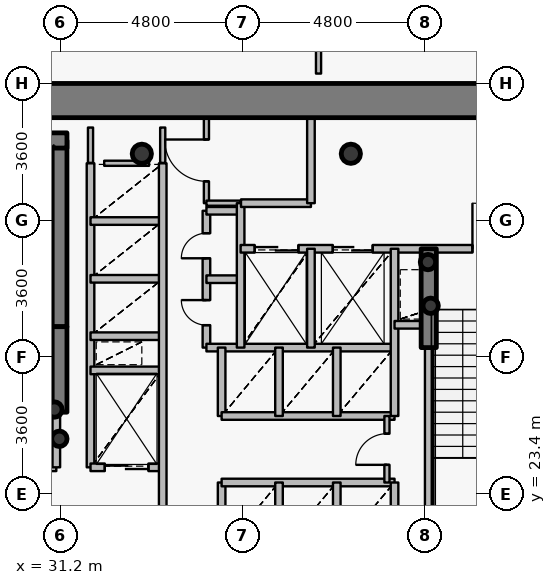
"""IFC4 building model, lengths in metres.
Left out: names, types, materials, properties, quantities, classifications, styles, units other than length and angle.
Written with IfcOpenShell. Run it as: python <this file> out.ifc"""

import sys

from ifc_helpers import new_model, si_unit, direction, frame, frame_2d, origin, origin_2d, place, context, subcontext, project, spatial, rectangle, hollow_circle, extrude, source, transform, mapped, element, fill, save


model = new_model("IFC4")
c1 = context("Model", 3, precision=1e-05, world=origin(), true_north=direction((0.0, 1.0)))
c2 = subcontext(c1, "Body", "Model", "MODEL_VIEW")
j1 = project(units=[si_unit("LENGTHUNIT", "METRE"), si_unit("PLANEANGLEUNIT", "RADIAN")], contexts=[c1])
p1 = place(None, origin())
s1 = spatial("IfcSite", under=j1, at=p1, CompositionType="ELEMENT")
p2 = place(p1, origin())
s2 = spatial("IfcBuilding", under=s1, at=p2, CompositionType="ELEMENT")
p3 = place(p2, frame((0.0, 0.0, 22.8)))
s3 = spatial("IfcBuildingStorey", under=s2, at=p3, CompositionType="ELEMENT", Elevation=22.8)
for number, where, z_axis, x_axis in (
    (1, (38.85, 32.35, 0.0), (0.0, 0.0, 1.0), (1.0, 0.0, 0.0)),
    (2, (33.35, 32.35, 0.0), (0.0, 0.0, 1.0), (1.0, 0.0, 0.0)),
):
    element("IfcColumn", number, at=place(p3, frame(where, z_axis=z_axis, x_axis=x_axis)), inside=s3, PredefinedType="COLUMN", context=c2, shape_type="SweptSolid", body=[
        extrude(hollow_circle(Radius=0.254, WallThickness=0.02, at=origin_2d()), origin(), (0.0, 0.0, 1.0), 4.2),
    ])
p4 = place(p3, frame((31.18, 27.8, 0.0), z_axis=(0.0, 0.0, 1.0), x_axis=(0.0, 1.0, 0.0)))
e3 = element("IfcWall", 3, at=p4, inside=s3, PredefinedType="SHEAR", context=c2, shape_type="SweptSolid", body=[
    extrude(rectangle(XDim=4.9, YDim=0.4, at=frame_2d((2.45, 0.0))), origin(), (0.0, 0.0, 1.0), 4.2),
])
p5 = place(p3, frame((27.28, 32.7, 0.0), z_axis=(0.0, 0.0, 1.0), x_axis=(1.0, 0.0, 0.0)))
e4 = element("IfcWall", 4, at=p5, inside=s3, PredefinedType="SHEAR", context=c2, shape_type="SweptSolid", body=[
    extrude(rectangle(XDim=4.1, YDim=0.4, at=frame_2d((2.05, 0.0))), origin(), (0.0, 0.0, 1.0), 4.2),
])
for number, where, z_axis, x_axis in (
    (5, (31.05, 25.62, 0.0), (0.0, 0.0, 1.0), (1.0, 0.0, 0.0)),
    (6, (31.18, 24.85, 0.0), (0.0, 0.0, 1.0), (1.0, 0.0, 0.0)),
    (7, (40.95, 28.35, 0.0), (0.0, 0.0, 1.0), (1.0, 0.0, 0.0)),
    (8, (40.88, 29.5, 0.0), (0.0, 0.0, 1.0), (1.0, 0.0, 0.0)),
):
    element("IfcColumn", number, at=place(p3, frame(where, z_axis=z_axis, x_axis=x_axis)), inside=s3, PredefinedType="COLUMN", context=c2, shape_type="SweptSolid", body=[
        extrude(hollow_circle(Radius=0.203, WallThickness=0.016, at=origin_2d()), origin(), (0.0, 0.0, 1.0), 4.2),
    ])
p6 = place(p3, frame((26.75, 33.75, 0.0), z_axis=(0.0, 0.0, 1.0), x_axis=(1.0, 0.0, 0.0)))
e9 = element("IfcWall", 9, at=p6, inside=s3, PredefinedType="SHEAR", context=c2, shape_type="SweptSolid", body=[
    extrude(rectangle(XDim=18.5, YDim=0.9, at=frame_2d((9.25, 0.0))), origin(), (0.0, 0.0, 1.0), 3.35),
])
p7 = place(p3, frame((31.18, 25.55, 0.0), z_axis=(0.0, 0.0, 1.0), x_axis=(0.0, 1.0, 0.0)))
e10 = element("IfcWall", 10, at=p7, inside=s3, PredefinedType="SHEAR", context=c2, shape_type="SweptSolid", body=[
    extrude(rectangle(XDim=2.25, YDim=0.4, at=frame_2d((1.125, 0.0))), origin(), (0.0, 0.0, 1.0), 3.5),
])
p8 = place(p3, frame((40.9, 27.25, 0.0), z_axis=(0.0, 0.0, 1.0), x_axis=(0.0, 1.0, 0.0)))
e11 = element("IfcWall", 11, at=p8, inside=s3, PredefinedType="SHEAR", context=c2, shape_type="SweptSolid", body=[
    extrude(rectangle(XDim=2.6, YDim=0.4, at=frame_2d((1.3, 0.0))), origin(), (0.0, 0.0, 1.0), 3.5),
])
p9 = place(p3, frame((27.56, 24.1, 0.0), z_axis=(0.0, 0.0, 1.0), x_axis=(1.0, 0.0, 0.0)))
e12 = element("IfcWall", 12, at=p9, inside=s3, PredefinedType="PARTITIONING", context=c2, shape_type="SweptSolid", body=[
    extrude(rectangle(XDim=3.54, YDim=0.2, at=frame_2d((1.77, 0.0))), origin(), (0.0, 0.0, 1.0), 3.9),
])
p10 = place(p9, frame((1.17, 0.0, 0.0)))
e13 = element("IfcOpeningElement", 13, at=p10, cuts=e12, PredefinedType="OPENING", context=c2, shape_type="SweptSolid", body=[
    extrude(rectangle(XDim=1.2, YDim=2.15, at=origin_2d()), frame((0.6, 0.11, 1.075), z_axis=(0.0, -1.0, 0.0), x_axis=(1.0, 0.0, 0.0)), (0.0, 0.0, 1.0), 0.22),
])
p11 = place(p3, frame((31.1, 24.1, 0.0), z_axis=(0.0, 0.0, 1.0), x_axis=(0.0, 1.0, 0.0)))
e14 = element("IfcWall", 14, at=p11, inside=s3, PredefinedType="PARTITIONING", context=c2, shape_type="SweptSolid", body=[
    extrude(rectangle(XDim=1.44, YDim=0.2, at=frame_2d((0.72, 0.0))), origin(), (0.0, 0.0, 1.0), 3.9),
])
p12 = place(p3, frame((32.0, 24.1, 0.0), z_axis=(0.0, 0.0, 1.0), x_axis=(0.0, 1.0, 0.0)))
e15 = element("IfcWall", 15, at=p12, inside=s3, PredefinedType="PARTITIONING", context=c2, shape_type="SweptSolid", body=[
    extrude(rectangle(XDim=8.0, YDim=0.2, at=frame_2d((4.0, 0.0))), origin(), (0.0, 0.0, 1.0), 3.9),
])
p13 = place(p3, frame((32.0, 24.1, 0.0), z_axis=(0.0, 0.0, 1.0), x_axis=(1.0, 0.0, 0.0)))
e16 = element("IfcWall", 16, at=p13, inside=s3, PredefinedType="PARTITIONING", context=c2, shape_type="SweptSolid", body=[
    extrude(rectangle(XDim=1.9, YDim=0.2, at=frame_2d((0.95, 0.0))), origin(), (0.0, 0.0, 1.0), 3.485),
])
p14 = place(p13, frame((0.375, 0.0, 0.0)))
e17 = element("IfcOpeningElement", 17, at=p14, cuts=e16, PredefinedType="OPENING", context=c2, shape_type="SweptSolid", body=[
    extrude(rectangle(XDim=1.15, YDim=2.15, at=origin_2d()), frame((0.575, 0.11, 1.075), z_axis=(0.0, -1.0, 0.0), x_axis=(1.0, 0.0, 0.0)), (0.0, 0.0, 1.0), 0.22),
])
for number, where, z_axis, x_axis in (
    (18, (32.0, 26.65, 0.0), (0.0, 0.0, 1.0), (1.0, 0.0, 0.0)),
    (19, (32.0, 27.55, 0.0), (0.0, 0.0, 1.0), (1.0, 0.0, 0.0)),
    (20, (32.0, 29.06, 0.0), (0.0, 0.0, 1.0), (1.0, 0.0, 0.0)),
    (21, (32.0, 30.58, 0.0), (0.0, 0.0, 1.0), (1.0, 0.0, 0.0)),
):
    element("IfcWall", number, at=place(p3, frame(where, z_axis=z_axis, x_axis=x_axis)), inside=s3, PredefinedType="PARTITIONING", context=c2, shape_type="SweptSolid", body=[
        extrude(rectangle(XDim=1.9, YDim=0.2, at=frame_2d((0.95, 0.0))), origin(), (0.0, 0.0, 1.0), 3.485),
    ])
p15 = place(p3, frame((33.9, 20.7, 0.0), z_axis=(0.0, 0.0, 1.0), x_axis=(0.0, 1.0, 0.0)))
e22 = element("IfcWall", 22, at=p15, inside=s3, PredefinedType="PARTITIONING", context=c2, shape_type="SweptSolid", body=[
    extrude(rectangle(XDim=11.4, YDim=0.2, at=frame_2d((5.7, 0.0))), origin(), (0.0, 0.0, 1.0), 3.485),
])
p16 = place(p3, frame((35.05, 27.25, 0.0), z_axis=(0.0, 0.0, 1.0), x_axis=(0.0, 1.0, 0.0)))
e23 = element("IfcWall", 23, at=p16, inside=s3, PredefinedType="PARTITIONING", context=c2, shape_type="SweptSolid", body=[
    extrude(rectangle(XDim=3.6, YDim=0.2, at=frame_2d((1.8, 0.0))), origin(), (0.0, 0.0, 1.0), 3.9),
])
p17 = place(p16, frame((0.59, 0.0, 0.0)))
e24 = element("IfcOpeningElement", 24, at=p17, cuts=e23, PredefinedType="OPENING", context=c2, shape_type="SweptSolid", body=[
    extrude(rectangle(XDim=0.66, YDim=2.05, at=origin_2d()), frame((0.33, 0.11, 1.025), z_axis=(0.0, -1.0, 0.0), x_axis=(1.0, 0.0, 0.0)), (0.0, 0.0, 1.0), 0.22),
])
p18 = place(p16, frame((2.35, 0.0, 0.0)))
e25 = element("IfcOpeningElement", 25, at=p18, cuts=e23, PredefinedType="OPENING", context=c2, shape_type="SweptSolid", body=[
    extrude(rectangle(XDim=0.66, YDim=2.05, at=origin_2d()), frame((0.33, 0.11, 1.025), z_axis=(0.0, -1.0, 0.0), x_axis=(1.0, 0.0, 0.0)), (0.0, 0.0, 1.0), 0.22),
])
p19 = place(p3, frame((35.05, 27.25, 0.0), z_axis=(0.0, 0.0, 1.0), x_axis=(1.0, 0.0, 0.0)))
e26 = element("IfcWall", 26, at=p19, inside=s3, PredefinedType="PARTITIONING", context=c2, shape_type="SweptSolid", body=[
    extrude(rectangle(XDim=4.95, YDim=0.2, at=frame_2d((2.475, 0.0))), origin(), (0.0, 0.0, 1.0), 3.485),
])
for number, where, z_axis, x_axis in (
    (27, (35.05, 29.05, 0.0), (0.0, 0.0, 1.0), (1.0, 0.0, 0.0)),
    (28, (35.05, 30.85, 0.0), (0.0, 0.0, 1.0), (1.0, 0.0, 0.0)),
):
    element("IfcWall", number, at=place(p3, frame(where, z_axis=z_axis, x_axis=x_axis)), inside=s3, PredefinedType="PARTITIONING", context=c2, shape_type="SweptSolid", body=[
        extrude(rectangle(XDim=0.9, YDim=0.2, at=frame_2d((0.45, 0.0))), origin(), (0.0, 0.0, 1.0), 3.9),
    ])
p20 = place(p3, frame((35.05, 31.05, 0.0), z_axis=(0.0, 0.0, 1.0), x_axis=(0.0, 1.0, 0.0)))
e29 = element("IfcWall", 29, at=p20, inside=s3, PredefinedType="PARTITIONING", context=c2, shape_type="SweptSolid", body=[
    extrude(rectangle(XDim=2.25, YDim=0.135, at=frame_2d((1.125, 0.0))), origin(), (0.0, 0.0, 1.0), 3.485),
])
p21 = place(p20, frame((0.575, 0.0, 0.0)))
e30 = element("IfcOpeningElement", 30, at=p21, cuts=e29, PredefinedType="OPENING", context=c2, shape_type="SweptSolid", body=[
    extrude(rectangle(XDim=1.1, YDim=2.15, at=origin_2d()), frame((0.55, 0.078, 1.075), z_axis=(0.0, -1.0, 0.0), x_axis=(1.0, 0.0, 0.0)), (0.0, 0.0, 1.0), 0.155),
])
p22 = place(p3, frame((35.05, 31.05, 0.0), z_axis=(0.0, 0.0, 1.0), x_axis=(1.0, 0.0, 0.0)))
e31 = element("IfcWall", 31, at=p22, inside=s3, PredefinedType="PARTITIONING", context=c2, shape_type="SweptSolid", body=[
    extrude(rectangle(XDim=0.9, YDim=0.135, at=frame_2d((0.45, 0.0))), origin(), (0.0, 0.0, 1.0), 3.9),
])
p23 = place(p3, frame((35.45, 21.9, 0.0), z_axis=(0.0, 0.0, 1.0), x_axis=(0.0, 1.0, 0.0)))
e32 = element("IfcWall", 32, at=p23, inside=s3, PredefinedType="PARTITIONING", context=c2, shape_type="SweptSolid", body=[
    extrude(rectangle(XDim=1.8, YDim=0.2, at=frame_2d((0.9, 0.0))), origin(), (0.0, 0.0, 1.0), 3.9),
])
p24 = place(p3, frame((35.45, 23.7, 0.0), z_axis=(0.0, 0.0, 1.0), x_axis=(1.0, 0.0, 0.0)))
e33 = element("IfcWall", 33, at=p24, inside=s3, PredefinedType="PARTITIONING", context=c2, shape_type="SweptSolid", body=[
    extrude(rectangle(XDim=4.55, YDim=0.2, at=frame_2d((2.275, 0.0))), origin(), (0.0, 0.0, 1.0), 3.485),
])
p25 = place(p3, frame((35.45, 25.45, 0.0), z_axis=(0.0, 0.0, 1.0), x_axis=(0.0, 1.0, 0.0)))
e34 = element("IfcWall", 34, at=p25, inside=s3, PredefinedType="PARTITIONING", context=c2, shape_type="SweptSolid", body=[
    extrude(rectangle(XDim=1.8, YDim=0.2, at=frame_2d((0.9, 0.0))), origin(), (0.0, 0.0, 1.0), 3.9),
])
p26 = place(p3, frame((35.45, 25.45, 0.0), z_axis=(0.0, 0.0, 1.0), x_axis=(1.0, 0.0, 0.0)))
e35 = element("IfcWall", 35, at=p26, inside=s3, PredefinedType="PARTITIONING", context=c2, shape_type="SweptSolid", body=[
    extrude(rectangle(XDim=4.55, YDim=0.2, at=frame_2d((2.275, 0.0))), origin(), (0.0, 0.0, 1.0), 3.485),
])
p27 = place(p3, frame((35.95, 27.25, 0.0), z_axis=(0.0, 0.0, 1.0), x_axis=(0.0, 1.0, 0.0)))
e36 = element("IfcWall", 36, at=p27, inside=s3, PredefinedType="PARTITIONING", context=c2, shape_type="SweptSolid", body=[
    extrude(rectangle(XDim=3.8, YDim=0.2, at=frame_2d((1.9, 0.0))), origin(), (0.0, 0.0, 1.0), 3.9),
])
p28 = place(p3, frame((35.95, 29.85, 0.0), z_axis=(0.0, 0.0, 1.0), x_axis=(1.0, 0.0, 0.0)))
e37 = element("IfcWall", 37, at=p28, inside=s3, PredefinedType="PARTITIONING", context=c2, shape_type="SweptSolid", body=[
    extrude(rectangle(XDim=8.49, YDim=0.2, at=frame_2d((4.245, 0.0))), origin(), (0.0, 0.0, 1.0), 3.485),
])
p29 = place(p28, frame((6.1, 0.0, 0.0)))
e38 = element("IfcOpeningElement", 38, at=p29, cuts=e37, PredefinedType="OPENING", context=c2, shape_type="SweptSolid", body=[
    extrude(rectangle(XDim=1.2, YDim=2.15, at=origin_2d()), frame((0.6, 0.11, 1.075), z_axis=(0.0, -1.0, 0.0), x_axis=(1.0, 0.0, 0.0)), (0.0, 0.0, 1.0), 0.22),
])
p30 = place(p28, frame((0.37, 0.0, 0.0)))
e39 = element("IfcOpeningElement", 39, at=p30, cuts=e37, PredefinedType="OPENING", context=c2, shape_type="SweptSolid", body=[
    extrude(rectangle(XDim=1.15, YDim=2.15, at=origin_2d()), frame((0.575, 0.11, 1.075), z_axis=(0.0, -1.0, 0.0), x_axis=(1.0, 0.0, 0.0)), (0.0, 0.0, 1.0), 0.22),
])
p31 = place(p28, frame((2.425, 0.0, 0.0)))
e40 = element("IfcOpeningElement", 40, at=p31, cuts=e37, PredefinedType="OPENING", context=c2, shape_type="SweptSolid", body=[
    extrude(rectangle(XDim=1.05, YDim=2.15, at=origin_2d()), frame((0.525, 0.11, 1.075), z_axis=(0.0, -1.0, 0.0), x_axis=(1.0, 0.0, 0.0)), (0.0, 0.0, 1.0), 0.22),
])
p32 = place(p3, frame((35.96, 31.05, 0.0), z_axis=(0.0, 0.0, 1.0), x_axis=(1.0, 0.0, 0.0)))
e41 = element("IfcWall", 41, at=p32, inside=s3, PredefinedType="PARTITIONING", context=c2, shape_type="SweptSolid", body=[
    extrude(rectangle(XDim=1.84, YDim=0.2, at=frame_2d((0.92, 0.0))), origin(), (0.0, 0.0, 1.0), 3.9),
])
for number, where, z_axis, x_axis in (
    (42, (36.96, 21.9, 0.0), (0.0, 0.0, 1.0), (0.0, 1.0, 0.0)),
    (43, (36.96, 25.45, 0.0), (0.0, 0.0, 1.0), (0.0, 1.0, 0.0)),
):
    element("IfcWall", number, at=place(p3, frame(where, z_axis=z_axis, x_axis=x_axis)), inside=s3, PredefinedType="PARTITIONING", context=c2, shape_type="SweptSolid", body=[
        extrude(rectangle(XDim=1.8, YDim=0.2, at=frame_2d((0.9, 0.0))), origin(), (0.0, 0.0, 1.0), 3.9),
    ])
p33 = place(p3, frame((37.8, 27.25, 0.0), z_axis=(0.0, 0.0, 1.0), x_axis=(0.0, 1.0, 0.0)))
e44 = element("IfcWall", 44, at=p33, inside=s3, PredefinedType="PARTITIONING", context=c2, shape_type="SweptSolid", body=[
    extrude(rectangle(XDim=2.6, YDim=0.2, at=frame_2d((1.3, 0.0))), origin(), (0.0, 0.0, 1.0), 3.9),
])
p34 = place(p3, frame((37.8, 31.05, 0.0), z_axis=(0.0, 0.0, 1.0), x_axis=(0.0, 1.0, 0.0)))
e45 = element("IfcWall", 45, at=p34, inside=s3, PredefinedType="PARTITIONING", context=c2, shape_type="SweptSolid", body=[
    extrude(rectangle(XDim=2.25, YDim=0.2, at=frame_2d((1.125, 0.0))), origin(), (0.0, 0.0, 1.0), 3.485),
])
for number, where, z_axis, x_axis in (
    (46, (38.48, 21.9, 0.0), (0.0, 0.0, 1.0), (0.0, 1.0, 0.0)),
    (47, (38.48, 25.45, 0.0), (0.0, 0.0, 1.0), (0.0, 1.0, 0.0)),
):
    element("IfcWall", number, at=place(p3, frame(where, z_axis=z_axis, x_axis=x_axis)), inside=s3, PredefinedType="PARTITIONING", context=c2, shape_type="SweptSolid", body=[
        extrude(rectangle(XDim=1.8, YDim=0.2, at=frame_2d((0.9, 0.0))), origin(), (0.0, 0.0, 1.0), 3.9),
    ])
p35 = place(p3, frame((39.8, 23.7, 0.0), z_axis=(0.0, 0.0, 1.0), x_axis=(0.0, 1.0, 0.0)))
e48 = element("IfcWall", 48, at=p35, inside=s3, PredefinedType="PARTITIONING", context=c2, shape_type="SweptSolid", body=[
    extrude(rectangle(XDim=1.75, YDim=0.135, at=frame_2d((0.875, 0.0))), origin(), (0.0, 0.0, 1.0), 3.9),
])
p36 = place(p35, frame((0.465, 0.0, 0.0)))
e49 = element("IfcOpeningElement", 49, at=p36, cuts=e48, PredefinedType="OPENING", context=c2, shape_type="SweptSolid", body=[
    extrude(rectangle(XDim=0.82, YDim=2.1, at=origin_2d()), frame((0.41, 0.078, 1.05), z_axis=(0.0, -1.0, 0.0), x_axis=(1.0, 0.0, 0.0)), (0.0, 0.0, 1.0), 0.155),
])
p37 = place(p3, frame((40.0, 21.9, 0.0), z_axis=(0.0, 0.0, 1.0), x_axis=(0.0, 1.0, 0.0)))
e50 = element("IfcWall", 50, at=p37, inside=s3, PredefinedType="PARTITIONING", context=c2, shape_type="SweptSolid", body=[
    extrude(rectangle(XDim=1.8, YDim=0.2, at=frame_2d((0.9, 0.0))), origin(), (0.0, 0.0, 1.0), 3.9),
])
p38 = place(p3, frame((40.0, 25.45, 0.0), z_axis=(0.0, 0.0, 1.0), x_axis=(0.0, 1.0, 0.0)))
e51 = element("IfcWall", 51, at=p38, inside=s3, PredefinedType="PARTITIONING", context=c2, shape_type="SweptSolid", body=[
    extrude(rectangle(XDim=4.4, YDim=0.2, at=frame_2d((2.2, 0.0))), origin(), (0.0, 0.0, 1.0), 3.9),
])
p39 = place(p3, frame((40.0, 27.85, 0.0), z_axis=(0.0, 0.0, 1.0), x_axis=(1.0, 0.0, 0.0)))
e52 = element("IfcWall", 52, at=p39, inside=s3, PredefinedType="PARTITIONING", context=c2, shape_type="SweptSolid", body=[
    extrude(rectangle(XDim=0.9, YDim=0.2, at=frame_2d((0.45, 0.0))), origin(), (0.0, 0.0, 1.0), 3.9),
])
p40 = place(p3, frame((40.9, 21.33, 0.0), z_axis=(0.0, 0.0, 1.0), x_axis=(0.0, 1.0, 0.0)))
e53 = element("IfcWall", 53, at=p40, inside=s3, PredefinedType="PARTITIONING", context=c2, shape_type="SweptSolid", body=[
    extrude(rectangle(XDim=5.91, YDim=0.2, at=frame_2d((2.955, 0.0))), origin(), (0.0, 0.0, 1.0), 3.435),
])
p41 = place(p3, frame((32.36, 32.1, 0.0), z_axis=(0.0, 0.0, 1.0), x_axis=(1.0, 0.0, 0.0)))
e54 = element("IfcWall", 54, at=p41, inside=s3, PredefinedType="PARTITIONING", context=c2, shape_type="SweptSolid", body=[
    extrude(rectangle(XDim=1.18, YDim=0.135, at=frame_2d((0.59, 0.0))), origin(), (0.0, 0.0, 1.0), 3.485),
])
p42 = place(p3, frame((32.0, 33.04, 0.0), z_axis=(0.0, 0.0, 1.0), x_axis=(0.0, -1.0, 0.0)))
e55 = element("IfcWall", 55, at=p42, inside=s3, PredefinedType="PARTITIONING", context=c2, shape_type="SweptSolid", body=[
    extrude(rectangle(XDim=0.93, YDim=0.135, at=frame_2d((0.465, 0.0))), origin(), (0.0, 0.0, 1.0), 3.435),
])
p43 = place(p3, frame((33.9, 32.11, 0.0), z_axis=(0.0, 0.0, 1.0), x_axis=(0.0, 1.0, 0.0)))
e56 = element("IfcWall", 56, at=p43, inside=s3, PredefinedType="PARTITIONING", context=c2, shape_type="SweptSolid", body=[
    extrude(rectangle(XDim=0.93, YDim=0.135, at=frame_2d((0.465, 0.0))), origin(), (0.0, 0.0, 1.0), 3.485),
])
p44 = place(p3, frame((38.0, 34.46, 0.0), z_axis=(0.0, 0.0, 1.0), x_axis=(0.0, 1.0, 0.0)))
e57 = element("IfcWall", 57, at=p44, inside=s3, PredefinedType="PARTITIONING", context=c2, shape_type="SweptSolid", body=[
    extrude(rectangle(XDim=1.64, YDim=0.135, at=frame_2d((0.82, 0.0))), origin(), (0.0, 0.0, 1.0), 3.9),
])
m1 = source(origin(), c2, "Body", "SweptSolid", [
    extrude(rectangle(XDim=1.2, YDim=2.15, at=origin_2d()), frame((0.6, 0.025, 1.075), z_axis=(0.0, -1.0, 0.0), x_axis=(1.0, 0.0, 0.0)), (0.0, 0.0, 1.0), 0.05),
])
p45 = place(p29, origin())
e58 = element("IfcDoor", 58, at=p45, inside=s3, OperationType="SINGLE_SWING_LEFT", PredefinedType="DOOR", context=c2, shape_type="MappedRepresentation", body=[
    mapped(m1, transform((0.0, 0.0, 0.0), x_axis=(1.0, 0.0, 0.0), y_axis=(0.0, 1.0, 0.0), z_axis=(0.0, 0.0, 1.0), scale=1.0)),
])
fill(e38, e58)
m2 = source(origin(), c2, "Body", "SweptSolid", [
    extrude(rectangle(XDim=1.15, YDim=2.15, at=origin_2d()), frame((0.575, 0.025, 1.075), z_axis=(0.0, -1.0, 0.0), x_axis=(1.0, 0.0, 0.0)), (0.0, 0.0, 1.0), 0.05),
])
p46 = place(p30, origin())
e59 = element("IfcDoor", 59, at=p46, inside=s3, OperationType="DOUBLE_DOOR_SLIDING", PredefinedType="USERDEFINED", context=c2, shape_type="MappedRepresentation", body=[
    mapped(m2, transform((0.0, 0.0, 0.0), x_axis=(1.0, 0.0, 0.0), y_axis=(0.0, 1.0, 0.0), z_axis=(0.0, 0.0, 1.0), scale=1.0)),
])
fill(e39, e59)
p47 = place(p14, origin())
e60 = element("IfcDoor", 60, at=p47, inside=s3, OperationType="DOUBLE_DOOR_SLIDING", PredefinedType="USERDEFINED", context=c2, shape_type="MappedRepresentation", body=[
    mapped(m2, transform((0.0, 0.0, 0.0), x_axis=(1.0, 0.0, 0.0), y_axis=(0.0, 1.0, 0.0), z_axis=(0.0, 0.0, 1.0), scale=1.0)),
])
fill(e17, e60)
m3 = source(origin(), c2, "Body", "SweptSolid", [
    extrude(rectangle(XDim=1.05, YDim=2.15, at=origin_2d()), frame((0.525, 0.025, 1.075), z_axis=(0.0, -1.0, 0.0), x_axis=(1.0, 0.0, 0.0)), (0.0, 0.0, 1.0), 0.05),
])
p48 = place(p31, origin())
e61 = element("IfcDoor", 61, at=p48, inside=s3, OperationType="DOUBLE_DOOR_SLIDING", PredefinedType="USERDEFINED", context=c2, shape_type="MappedRepresentation", body=[
    mapped(m3, transform((0.0, 0.0, 0.0), x_axis=(1.0, 0.0, 0.0), y_axis=(0.0, 1.0, 0.0), z_axis=(0.0, 0.0, 1.0), scale=1.0)),
])
fill(e40, e61)
m4 = source(origin(), c2, "Body", "SweptSolid", [
    extrude(rectangle(XDim=0.66, YDim=2.05, at=origin_2d()), frame((0.33, 0.025, 1.025), z_axis=(0.0, -1.0, 0.0), x_axis=(1.0, 0.0, 0.0)), (0.0, 0.0, 1.0), 0.05),
])
p49 = place(p17, origin())
e62 = element("IfcDoor", 62, at=p49, inside=s3, OperationType="SINGLE_SWING_RIGHT", PredefinedType="USERDEFINED", context=c2, shape_type="MappedRepresentation", body=[
    mapped(m4, transform((0.0, 0.0, 0.0), x_axis=(1.0, 0.0, 0.0), y_axis=(0.0, 1.0, 0.0), z_axis=(0.0, 0.0, 1.0), scale=1.0)),
])
fill(e24, e62)
p50 = place(p18, origin())
e63 = element("IfcDoor", 63, at=p50, inside=s3, OperationType="SINGLE_SWING_LEFT", PredefinedType="USERDEFINED", context=c2, shape_type="MappedRepresentation", body=[
    mapped(m4, transform((0.0, 0.0, 0.0), x_axis=(1.0, 0.0, 0.0), y_axis=(0.0, 1.0, 0.0), z_axis=(0.0, 0.0, 1.0), scale=1.0)),
])
fill(e25, e63)
m5 = source(origin(), c2, "Body", "SweptSolid", [
    extrude(rectangle(XDim=1.1, YDim=2.15, at=origin_2d()), frame((0.55, 0.025, 1.075), z_axis=(0.0, -1.0, 0.0), x_axis=(1.0, 0.0, 0.0)), (0.0, 0.0, 1.0), 0.05),
])
p51 = place(p21, origin())
e64 = element("IfcDoor", 64, at=p51, inside=s3, OperationType="SINGLE_SWING_RIGHT", PredefinedType="DOOR", context=c2, shape_type="MappedRepresentation", body=[
    mapped(m5, transform((0.0, 0.0, 0.0), x_axis=(1.0, 0.0, 0.0), y_axis=(0.0, 1.0, 0.0), z_axis=(0.0, 0.0, 1.0), scale=1.0)),
])
fill(e30, e64)
m6 = source(origin(), c2, "Body", "SweptSolid", [
    extrude(rectangle(XDim=0.82, YDim=2.1, at=origin_2d()), frame((0.41, 0.025, 1.05), z_axis=(0.0, -1.0, 0.0), x_axis=(1.0, 0.0, 0.0)), (0.0, 0.0, 1.0), 0.05),
])
p52 = place(p36, origin())
e65 = element("IfcDoor", 65, at=p52, inside=s3, OperationType="SINGLE_SWING_LEFT", PredefinedType="DOOR", context=c2, shape_type="MappedRepresentation", body=[
    mapped(m6, transform((0.0, 0.0, 0.0), x_axis=(1.0, 0.0, 0.0), y_axis=(0.0, 1.0, 0.0), z_axis=(0.0, 0.0, 1.0), scale=1.0)),
])
fill(e49, e65)
save(model, sys.argv[1])
